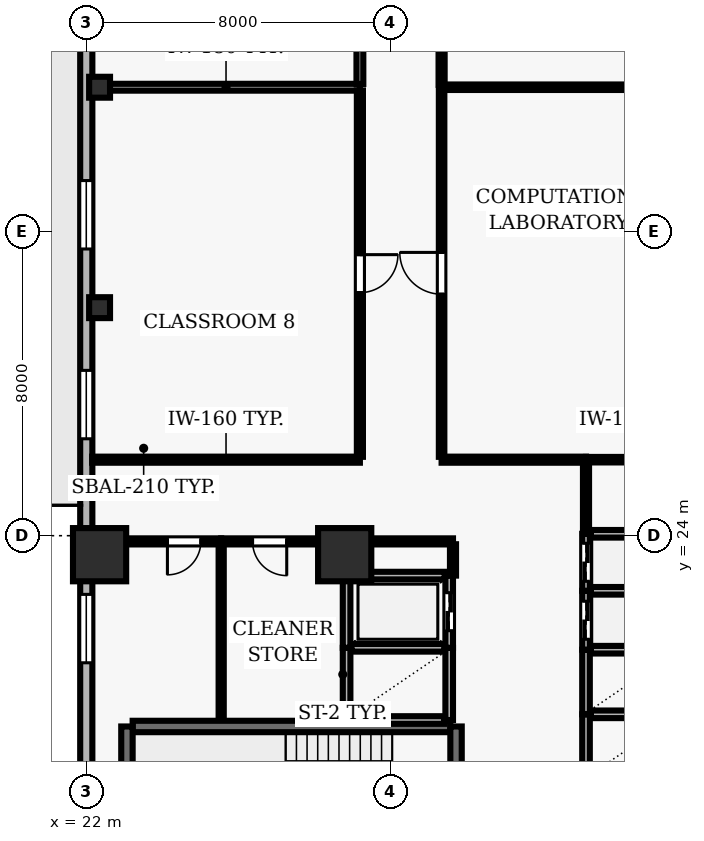
"""IFC4 building model, lengths in metres.
Left out: names, types, materials, properties, quantities, classifications, styles, units other than length and angle.
Written with IfcOpenShell. Run it as: python <this file> out.ifc"""

import sys

from ifc_helpers import new_model, si_unit, direction, frame, frame_2d, origin, origin_2d, place, context, subcontext, project, spatial, rectangle, hollow_rectangle, extrude, element, fill, save


model = new_model("IFC4")
c1 = context("Model", 3, precision=1e-05, world=origin(), true_north=direction((0.0, 1.0)))
c2 = subcontext(c1, "Body", "Model", "MODEL_VIEW")
j1 = project(units=[si_unit("LENGTHUNIT", "METRE"), si_unit("PLANEANGLEUNIT", "RADIAN")], contexts=[c1])
p1 = place(None, origin())
s1 = spatial("IfcSite", under=j1, at=p1, CompositionType="ELEMENT")
p2 = place(p1, origin())
s2 = spatial("IfcBuilding", under=s1, at=p2, CompositionType="ELEMENT")
p3 = place(p2, frame((0.0, 0.0, 31.0)))
s3 = spatial("IfcBuildingStorey", under=s2, at=p3, CompositionType="ELEMENT", Elevation=31.0)
for number, where, z_axis, x_axis in (
    (1, (22.35, 23.5, 0.0), (0.0, 0.0, 1.0), (1.0, 0.0, 0.0)),
    (2, (28.8, 23.5, 0.0), (0.0, 0.0, 1.0), (1.0, 0.0, 0.0)),
):
    element("IfcColumn", number, at=place(p3, frame(where, z_axis=z_axis, x_axis=x_axis)), inside=s3, PredefinedType="COLUMN", context=c2, shape_type="SweptSolid", body=[
        extrude(rectangle(XDim=1.4, YDim=1.4, at=origin_2d()), origin(), (0.0, 0.0, 1.0), 3.9),
    ])
for number, where, z_axis, x_axis in (
    (3, (22.35, 30.0, 0.0), (0.0, 0.0, 1.0), (1.0, 0.0, 0.0)),
    (4, (22.35, 35.8, 0.0), (0.0, 0.0, 1.0), (1.0, 0.0, 0.0)),
):
    element("IfcColumn", number, at=place(p3, frame(where, z_axis=z_axis, x_axis=x_axis)), inside=s3, PredefinedType="COLUMN", context=c2, shape_type="SweptSolid", body=[
        extrude(hollow_rectangle(XDim=0.55, YDim=0.55, WallThickness=0.025, at=origin_2d()), origin(), (0.0, 0.0, 1.0), 3.9),
    ])
p4 = place(p3, frame((22.0, 51.5, 0.0), z_axis=(0.0, 0.0, 1.0), x_axis=(0.0, -1.0, 0.0)))
e5 = element("IfcWall", 5, at=p4, inside=s3, PredefinedType="SOLIDWALL", context=c2, shape_type="SweptSolid", body=[
    extrude(rectangle(XDim=49.0, YDim=0.32, at=frame_2d((24.5, 0.0))), origin(), (0.0, 0.0, 1.0), 3.69),
])
p5 = place(p4, frame((12.1, 0.0, 0.0)))
e6 = element("IfcOpeningElement", 6, at=p5, cuts=e5, PredefinedType="OPENING", context=c2, shape_type="SweptSolid", body=[
    extrude(rectangle(XDim=1.0, YDim=2.2, at=frame_2d((0.5, 1.1))), frame((0.0, 0.17, 0.0), z_axis=(0.0, -1.0, 0.0), x_axis=(1.0, 0.0, 0.0)), (0.0, 0.0, 1.0), 0.34),
])
p6 = place(p4, frame((1.822, 0.0, 0.9)))
e7 = element("IfcOpeningElement", 7, at=p6, cuts=e5, PredefinedType="OPENING", context=c2, shape_type="SweptSolid", body=[
    extrude(rectangle(XDim=1.8, YDim=1.8, at=frame_2d((0.9, 0.9))), frame((0.0, 0.17, 0.0), z_axis=(0.0, -1.0, 0.0), x_axis=(1.0, 0.0, 0.0)), (0.0, 0.0, 1.0), 0.34),
])
p7 = place(p4, frame((7.267, 0.0, 0.9)))
e8 = element("IfcOpeningElement", 8, at=p7, cuts=e5, PredefinedType="OPENING", context=c2, shape_type="SweptSolid", body=[
    extrude(rectangle(XDim=1.8, YDim=1.8, at=frame_2d((0.9, 0.9))), frame((0.0, 0.17, 0.0), z_axis=(0.0, -1.0, 0.0), x_axis=(1.0, 0.0, 0.0)), (0.0, 0.0, 1.0), 0.34),
])
p8 = place(p4, frame((18.156, 0.0, 0.9)))
e9 = element("IfcOpeningElement", 9, at=p8, cuts=e5, PredefinedType="OPENING", context=c2, shape_type="SweptSolid", body=[
    extrude(rectangle(XDim=1.8, YDim=1.8, at=frame_2d((0.9, 0.9))), frame((0.0, 0.17, 0.0), z_axis=(0.0, -1.0, 0.0), x_axis=(1.0, 0.0, 0.0)), (0.0, 0.0, 1.0), 0.34),
])
p9 = place(p4, frame((23.15, 0.0, 0.9)))
e10 = element("IfcOpeningElement", 10, at=p9, cuts=e5, PredefinedType="OPENING", context=c2, shape_type="SweptSolid", body=[
    extrude(rectangle(XDim=1.8, YDim=1.8, at=frame_2d((0.9, 0.9))), frame((0.0, 0.17, 0.0), z_axis=(0.0, -1.0, 0.0), x_axis=(1.0, 0.0, 0.0)), (0.0, 0.0, 1.0), 0.34),
])
p10 = place(p4, frame((29.044, 0.0, 0.9)))
e11 = element("IfcOpeningElement", 11, at=p10, cuts=e5, PredefinedType="OPENING", context=c2, shape_type="SweptSolid", body=[
    extrude(rectangle(XDim=1.8, YDim=1.8, at=frame_2d((0.9, 0.9))), frame((0.0, 0.17, 0.0), z_axis=(0.0, -1.0, 0.0), x_axis=(1.0, 0.0, 0.0)), (0.0, 0.0, 1.0), 0.34),
])
p11 = place(p4, frame((34.039, 0.0, 0.9)))
e12 = element("IfcOpeningElement", 12, at=p11, cuts=e5, PredefinedType="OPENING", context=c2, shape_type="SweptSolid", body=[
    extrude(rectangle(XDim=1.8, YDim=1.8, at=frame_2d((0.9, 0.9))), frame((0.0, 0.17, 0.0), z_axis=(0.0, -1.0, 0.0), x_axis=(1.0, 0.0, 0.0)), (0.0, 0.0, 1.0), 0.34),
])
p12 = place(p4, frame((39.933, 0.0, 0.9)))
e13 = element("IfcOpeningElement", 13, at=p12, cuts=e5, PredefinedType="OPENING", context=c2, shape_type="SweptSolid", body=[
    extrude(rectangle(XDim=1.8, YDim=1.8, at=frame_2d((0.9, 0.9))), frame((0.0, 0.17, 0.0), z_axis=(0.0, -1.0, 0.0), x_axis=(1.0, 0.0, 0.0)), (0.0, 0.0, 1.0), 0.34),
])
p13 = place(p3, frame((31.58, 18.98, 0.0), z_axis=(0.0, 0.0, 1.0), x_axis=(-1.0, 0.0, 0.0)))
e14 = element("IfcWall", 14, at=p13, inside=s3, PredefinedType="SHEAR", context=c2, shape_type="SweptSolid", body=[
    extrude(rectangle(XDim=8.36, YDim=0.3, at=frame_2d((4.18, 0.0))), origin(), (0.0, 0.0, 1.0), 3.69),
])
p14 = place(p3, frame((23.07, 18.98, 0.0), z_axis=(0.0, 0.0, 1.0), x_axis=(0.0, -1.0, 0.0)))
e15 = element("IfcWall", 15, at=p14, inside=s3, PredefinedType="SHEAR", context=c2, shape_type="SweptSolid", body=[
    extrude(rectangle(XDim=3.51, YDim=0.3, at=frame_2d((1.755, 0.0))), origin(), (0.0, 0.0, 1.0), 3.69),
])
p15 = place(p3, frame((31.73, 15.47, 0.0), z_axis=(0.0, 0.0, 1.0), x_axis=(0.0, 1.0, 0.0)))
e16 = element("IfcWall", 16, at=p15, inside=s3, PredefinedType="SHEAR", context=c2, shape_type="SweptSolid", body=[
    extrude(rectangle(XDim=3.51, YDim=0.3, at=frame_2d((1.755, 0.0))), origin(), (0.0, 0.0, 1.0), 3.69),
])
p16 = place(p15, frame((1.18, 0.0, 0.0)))
e17 = element("IfcOpeningElement", 17, at=p16, cuts=e16, PredefinedType="OPENING", context=c2, shape_type="SweptSolid", body=[
    extrude(rectangle(XDim=1.15, YDim=2.15, at=frame_2d((0.575, 1.075))), frame((0.0, 0.16, 0.0), z_axis=(0.0, -1.0, 0.0), x_axis=(1.0, 0.0, 0.0)), (0.0, 0.0, 1.0), 0.32),
])
p17 = place(p3, frame((35.15, 19.3, 0.0), z_axis=(0.0, 0.0, 1.0), x_axis=(0.0, -1.0, 0.0)))
e18 = element("IfcWall", 18, at=p17, inside=s3, PredefinedType="SOLIDWALL", context=c2, shape_type="SweptSolid", body=[
    extrude(rectangle(XDim=1.7, YDim=0.2, at=frame_2d((0.85, 0.0))), origin(), (0.0, 0.0, 1.0), 3.69),
])
p18 = place(p3, frame((37.42, 19.3, 0.0), z_axis=(0.0, 0.0, 1.0), x_axis=(-1.0, 0.0, 0.0)))
e19 = element("IfcWall", 19, at=p18, inside=s3, PredefinedType="SOLIDWALL", context=c2, shape_type="SweptSolid", body=[
    extrude(rectangle(XDim=2.14, YDim=0.2, at=frame_2d((1.07, 0.0))), origin(), (0.0, 0.0, 1.0), 3.69),
])
p19 = place(p3, frame((35.15, 21.0, 0.0), z_axis=(0.0, 0.0, 1.0), x_axis=(0.0, -1.0, 0.0)))
e20 = element("IfcWall", 20, at=p19, inside=s3, PredefinedType="SOLIDWALL", context=c2, shape_type="SweptSolid", body=[
    extrude(rectangle(XDim=1.7, YDim=0.2, at=frame_2d((0.85, 0.0))), origin(), (0.0, 0.0, 1.0), 3.69),
])
p20 = place(p3, frame((37.42, 21.0, 0.0), z_axis=(0.0, 0.0, 1.0), x_axis=(-1.0, 0.0, 0.0)))
e21 = element("IfcWall", 21, at=p20, inside=s3, PredefinedType="SOLIDWALL", context=c2, shape_type="SweptSolid", body=[
    extrude(rectangle(XDim=2.14, YDim=0.2, at=frame_2d((1.07, 0.0))), origin(), (0.0, 0.0, 1.0), 3.69),
])
for number, where, z_axis, x_axis in (
    (22, (28.85, 21.05, 0.0), (0.0, 0.0, 1.0), (0.0, -1.0, 0.0)),
    (23, (31.55, 19.15, 0.0), (0.0, 0.0, 1.0), (0.0, 1.0, 0.0)),
):
    element("IfcWall", number, at=place(p3, frame(where, z_axis=z_axis, x_axis=x_axis)), inside=s3, PredefinedType="SOLIDWALL", context=c2, shape_type="SweptSolid", body=[
        extrude(rectangle(XDim=1.9, YDim=0.2, at=frame_2d((0.95, 0.0))), origin(), (0.0, 0.0, 1.0), 3.69),
    ])
for number, where, z_axis, x_axis in (
    (24, (28.98, 19.15, 0.0), (0.0, 0.0, 1.0), (1.0, 0.0, 0.0)),
    (25, (31.42, 21.05, 0.0), (0.0, 0.0, 1.0), (-1.0, 0.0, 0.0)),
):
    element("IfcWall", number, at=place(p3, frame(where, z_axis=z_axis, x_axis=x_axis)), inside=s3, PredefinedType="SOLIDWALL", context=c2, shape_type="SweptSolid", body=[
        extrude(rectangle(XDim=2.44, YDim=0.2, at=frame_2d((1.22, 0.0))), origin(), (0.0, 0.0, 1.0), 3.69),
    ])
p21 = place(p3, frame((35.15, 22.55, 0.0), z_axis=(0.0, 0.0, 1.0), x_axis=(0.0, -1.0, 0.0)))
e26 = element("IfcWall", 26, at=p21, inside=s3, PredefinedType="SOLIDWALL", context=c2, shape_type="SweptSolid", body=[
    extrude(rectangle(XDim=1.55, YDim=0.2, at=frame_2d((0.775, 0.0))), origin(), (0.0, 0.0, 1.0), 3.69),
])
p22 = place(p21, frame((0.275, 0.0, 0.0)))
e27 = element("IfcOpeningElement", 27, at=p22, cuts=e26, PredefinedType="OPENING", context=c2, shape_type="SweptSolid", body=[
    extrude(rectangle(XDim=1.0, YDim=2.1, at=frame_2d((0.5, 1.05))), frame((0.0, 0.11, 0.0), z_axis=(0.0, -1.0, 0.0), x_axis=(1.0, 0.0, 0.0)), (0.0, 0.0, 1.0), 0.22),
])
p23 = place(p3, frame((37.42, 22.55, 0.0), z_axis=(0.0, 0.0, 1.0), x_axis=(-1.0, 0.0, 0.0)))
e28 = element("IfcWall", 28, at=p23, inside=s3, PredefinedType="SOLIDWALL", context=c2, shape_type="SweptSolid", body=[
    extrude(rectangle(XDim=2.14, YDim=0.2, at=frame_2d((1.07, 0.0))), origin(), (0.0, 0.0, 1.0), 3.69),
])
p24 = place(p3, frame((35.15, 24.05, 0.0), z_axis=(0.0, 0.0, 1.0), x_axis=(0.0, -1.0, 0.0)))
e29 = element("IfcWall", 29, at=p24, inside=s3, PredefinedType="SOLIDWALL", context=c2, shape_type="SweptSolid", body=[
    extrude(rectangle(XDim=1.5, YDim=0.2, at=frame_2d((0.75, 0.0))), origin(), (0.0, 0.0, 1.0), 3.69),
])
p25 = place(p24, frame((0.25, 0.0, 0.0)))
e30 = element("IfcOpeningElement", 30, at=p25, cuts=e29, PredefinedType="OPENING", context=c2, shape_type="SweptSolid", body=[
    extrude(rectangle(XDim=1.0, YDim=2.1, at=frame_2d((0.5, 1.05))), frame((0.0, 0.11, 0.0), z_axis=(0.0, -1.0, 0.0), x_axis=(1.0, 0.0, 0.0)), (0.0, 0.0, 1.0), 0.22),
])
p26 = place(p3, frame((37.42, 24.05, 0.0), z_axis=(0.0, 0.0, 1.0), x_axis=(-1.0, 0.0, 0.0)))
e31 = element("IfcWall", 31, at=p26, inside=s3, PredefinedType="SOLIDWALL", context=c2, shape_type="SweptSolid", body=[
    extrude(rectangle(XDim=2.14, YDim=0.2, at=frame_2d((1.07, 0.0))), origin(), (0.0, 0.0, 1.0), 3.69),
])
p27 = place(p3, frame((28.85, 22.95, 0.0), z_axis=(0.0, 0.0, 1.0), x_axis=(0.0, -1.0, 0.0)))
e32 = element("IfcWall", 32, at=p27, inside=s3, PredefinedType="SOLIDWALL", context=c2, shape_type="SweptSolid", body=[
    extrude(rectangle(XDim=1.9, YDim=0.2, at=frame_2d((0.95, 0.0))), origin(), (0.0, 0.0, 1.0), 3.69),
])
p28 = place(p3, frame((31.55, 21.05, 0.0), z_axis=(0.0, 0.0, 1.0), x_axis=(0.0, 1.0, 0.0)))
e33 = element("IfcWall", 33, at=p28, inside=s3, PredefinedType="SOLIDWALL", context=c2, shape_type="SweptSolid", body=[
    extrude(rectangle(XDim=1.9, YDim=0.2, at=frame_2d((0.95, 0.0))), origin(), (0.0, 0.0, 1.0), 3.69),
])
p29 = place(p28, frame((0.45, 0.0, 0.0)))
e34 = element("IfcOpeningElement", 34, at=p29, cuts=e33, PredefinedType="OPENING", context=c2, shape_type="SweptSolid", body=[
    extrude(rectangle(XDim=1.0, YDim=2.1, at=frame_2d((0.5, 1.05))), frame((0.0, 0.11, 0.0), z_axis=(0.0, -1.0, 0.0), x_axis=(1.0, 0.0, 0.0)), (0.0, 0.0, 1.0), 0.22),
])
p30 = place(p3, frame((31.43, 22.95, 0.0), z_axis=(0.0, 0.0, 1.0), x_axis=(-1.0, 0.0, 0.0)))
e35 = element("IfcWall", 35, at=p30, inside=s3, PredefinedType="SOLIDWALL", context=c2, shape_type="SweptSolid", body=[
    extrude(rectangle(XDim=2.46, YDim=0.2, at=frame_2d((1.23, 0.0))), origin(), (0.0, 0.0, 1.0), 3.69),
])
p31 = place(p3, frame((25.55, 23.85, 0.0), z_axis=(0.0, 0.0, 1.0), x_axis=(-1.0, 0.0, 0.0)))
e36 = element("IfcWall", 36, at=p31, inside=s3, PredefinedType="PARTITIONING", context=c2, shape_type="SweptSolid", body=[
    extrude(rectangle(XDim=3.35, YDim=0.16, at=frame_2d((1.675, 0.0))), origin(), (0.0, 0.0, 1.0), 2.995),
])
p32 = place(p31, frame((0.535, 0.0, 0.0)))
e37 = element("IfcOpeningElement", 37, at=p32, cuts=e36, PredefinedType="OPENING", context=c2, shape_type="SweptSolid", body=[
    extrude(rectangle(XDim=0.88, YDim=2.1, at=frame_2d((0.44, 1.05))), frame((0.0, 0.09, 0.0), z_axis=(0.0, -1.0, 0.0), x_axis=(1.0, 0.0, 0.0)), (0.0, 0.0, 1.0), 0.18),
])
p33 = place(p3, frame((28.8, 23.85, 0.0), z_axis=(0.0, 0.0, 1.0), x_axis=(-1.0, 0.0, 0.0)))
e38 = element("IfcWall", 38, at=p33, inside=s3, PredefinedType="PARTITIONING", context=c2, shape_type="SweptSolid", body=[
    extrude(rectangle(XDim=3.25, YDim=0.16, at=frame_2d((1.625, 0.0))), origin(), (0.0, 0.0, 1.0), 2.995),
])
p34 = place(p33, frame((1.525, 0.0, 0.0)))
e39 = element("IfcOpeningElement", 39, at=p34, cuts=e38, PredefinedType="OPENING", context=c2, shape_type="SweptSolid", body=[
    extrude(rectangle(XDim=0.9, YDim=2.1, at=frame_2d((0.45, 1.05))), frame((0.0, 0.09, 0.0), z_axis=(0.0, -1.0, 0.0), x_axis=(1.0, 0.0, 0.0)), (0.0, 0.0, 1.0), 0.18),
])
p35 = place(p3, frame((28.8, 23.85, 0.0), z_axis=(0.0, 0.0, 1.0), x_axis=(1.0, 0.0, 0.0)))
e40 = element("IfcWall", 40, at=p35, inside=s3, PredefinedType="PARTITIONING", context=c2, shape_type="SweptSolid", body=[
    extrude(rectangle(XDim=2.85, YDim=0.16, at=frame_2d((1.425, 0.0))), origin(), (0.0, 0.0, 1.0), 3.69),
])
p36 = place(p3, frame((29.2, 26.0, 0.0), z_axis=(0.0, 0.0, 1.0), x_axis=(-1.0, 0.0, 0.0)))
e41 = element("IfcWall", 41, at=p36, inside=s3, PredefinedType="PARTITIONING", context=c2, shape_type="SweptSolid", body=[
    extrude(rectangle(XDim=7.045, YDim=0.16, at=frame_2d((3.522, 0.0))), origin(), (0.0, 0.0, 1.0), 3.69),
])
p37 = place(p3, frame((29.2, 35.8, 0.0), z_axis=(0.0, 0.0, 1.0), x_axis=(-1.0, 0.0, 0.0)))
e42 = element("IfcWall", 42, at=p37, inside=s3, PredefinedType="PARTITIONING", context=c2, shape_type="SweptSolid", body=[
    extrude(rectangle(XDim=7.045, YDim=0.18, at=frame_2d((3.522, 0.0))), origin(), (0.0, 0.0, 1.0), 2.995),
])
p38 = place(p3, frame((35.15, 26.0, 0.0), z_axis=(0.0, 0.0, 1.0), x_axis=(-1.0, 0.0, 0.0)))
e43 = element("IfcWall", 43, at=p38, inside=s3, PredefinedType="PARTITIONING", context=c2, shape_type="SweptSolid", body=[
    extrude(rectangle(XDim=3.8, YDim=0.16, at=frame_2d((1.9, 0.0))), origin(), (0.0, 0.0, 1.0), 3.69),
])
p39 = place(p3, frame((35.15, 26.0, 0.0), z_axis=(0.0, 0.0, 1.0), x_axis=(1.0, 0.0, 0.0)))
e44 = element("IfcWall", 44, at=p39, inside=s3, PredefinedType="PARTITIONING", context=c2, shape_type="SweptSolid", body=[
    extrude(rectangle(XDim=2.7, YDim=0.145, at=frame_2d((1.35, 0.0))), origin(), (0.0, 0.0, 1.0), 3.69),
])
p40 = place(p3, frame((37.845, 35.8, 0.0), z_axis=(0.0, 0.0, 1.0), x_axis=(-1.0, 0.0, 0.0)))
e45 = element("IfcWall", 45, at=p40, inside=s3, PredefinedType="PARTITIONING", context=c2, shape_type="SweptSolid", body=[
    extrude(rectangle(XDim=6.495, YDim=0.145, at=frame_2d((3.248, 0.0))), origin(), (0.0, 0.0, 1.0), 2.995),
])
p41 = place(p3, frame((25.55, 19.16, 0.0), z_axis=(0.0, 0.0, 1.0), x_axis=(0.0, 1.0, 0.0)))
e46 = element("IfcWall", 46, at=p41, inside=s3, PredefinedType="PARTITIONING", context=c2, shape_type="SweptSolid", body=[
    extrude(rectangle(XDim=4.615, YDim=0.135, at=frame_2d((2.308, 0.0))), origin(), (0.0, 0.0, 1.0), 3.69),
])
p42 = place(p3, frame((28.8, 22.95, 0.0), z_axis=(0.0, 0.0, 1.0), x_axis=(0.0, 1.0, 0.0)))
e47 = element("IfcWall", 47, at=p42, inside=s3, PredefinedType="PARTITIONING", context=c2, shape_type="SweptSolid", body=[
    extrude(rectangle(XDim=0.825, YDim=0.125, at=frame_2d((0.413, 0.0))), origin(), (0.0, 0.0, 1.0), 3.69),
])
p43 = place(p3, frame((29.2, 35.715, 0.0), z_axis=(0.0, 0.0, 1.0), x_axis=(0.0, -1.0, 0.0)))
e48 = element("IfcWall", 48, at=p43, inside=s3, PredefinedType="PARTITIONING", context=c2, shape_type="SweptSolid", body=[
    extrude(rectangle(XDim=9.64, YDim=0.16, at=frame_2d((4.82, 0.0))), origin(), (0.0, 0.0, 1.0), 3.69),
])
p44 = place(p43, frame((4.32, 0.0, 0.0)))
e49 = element("IfcOpeningElement", 49, at=p44, cuts=e48, PredefinedType="OPENING", context=c2, shape_type="SweptSolid", body=[
    extrude(rectangle(XDim=1.0, YDim=2.1, at=frame_2d((0.5, 1.05))), frame((0.0, 0.09, 0.0), z_axis=(0.0, -1.0, 0.0), x_axis=(1.0, 0.0, 0.0)), (0.0, 0.0, 1.0), 0.18),
])
p45 = place(p3, frame((29.2, 44.955, 0.0), z_axis=(0.0, 0.0, 1.0), x_axis=(0.0, -1.0, 0.0)))
e50 = element("IfcWall", 50, at=p45, inside=s3, PredefinedType="PARTITIONING", context=c2, shape_type="SweptSolid", body=[
    extrude(rectangle(XDim=9.07, YDim=0.18, at=frame_2d((4.535, 0.0))), origin(), (0.0, 0.0, 1.0), 3.69),
])
p46 = place(p45, frame((4.06, 0.0, 0.0)))
e51 = element("IfcOpeningElement", 51, at=p46, cuts=e50, PredefinedType="OPENING", context=c2, shape_type="SweptSolid", body=[
    extrude(rectangle(XDim=0.95, YDim=2.1, at=frame_2d((0.475, 1.05))), frame((0.0, 0.1, 0.0), z_axis=(0.0, -1.0, 0.0), x_axis=(1.0, 0.0, 0.0)), (0.0, 0.0, 1.0), 0.2),
])
p47 = place(p3, frame((31.35, 26.075, 0.0), z_axis=(0.0, 0.0, 1.0), x_axis=(0.0, 1.0, 0.0)))
e52 = element("IfcWall", 52, at=p47, inside=s3, PredefinedType="PARTITIONING", context=c2, shape_type="SweptSolid", body=[
    extrude(rectangle(XDim=9.657, YDim=0.145, at=frame_2d((4.829, 0.0))), origin(), (0.0, 0.0, 1.0), 3.69),
])
p48 = place(p47, frame((4.279, 0.0, 0.0)))
e53 = element("IfcOpeningElement", 53, at=p48, cuts=e52, PredefinedType="OPENING", context=c2, shape_type="SweptSolid", body=[
    extrude(rectangle(XDim=1.1, YDim=2.15, at=frame_2d((0.55, 1.075))), frame((0.0, 0.083, 0.0), z_axis=(0.0, -1.0, 0.0), x_axis=(1.0, 0.0, 0.0)), (0.0, 0.0, 1.0), 0.165),
])
p49 = place(p3, frame((31.35, 35.867, 0.0), z_axis=(0.0, 0.0, 1.0), x_axis=(0.0, 1.0, 0.0)))
e54 = element("IfcWall", 54, at=p49, inside=s3, PredefinedType="PARTITIONING", context=c2, shape_type="SweptSolid", body=[
    extrude(rectangle(XDim=9.116, YDim=0.16, at=frame_2d((4.558, 0.0))), origin(), (0.0, 0.0, 1.0), 3.69),
])
p50 = place(p49, frame((4.108, 0.0, 0.0)))
e55 = element("IfcOpeningElement", 55, at=p50, cuts=e54, PredefinedType="OPENING", context=c2, shape_type="SweptSolid", body=[
    extrude(rectangle(XDim=0.9, YDim=2.1, at=frame_2d((0.45, 1.05))), frame((0.0, 0.09, 0.0), z_axis=(0.0, -1.0, 0.0), x_axis=(1.0, 0.0, 0.0)), (0.0, 0.0, 1.0), 0.18),
])
p51 = place(p3, frame((31.65, 23.775, 0.0), z_axis=(0.0, 0.0, 1.0), x_axis=(0.0, -1.0, 0.0)))
e56 = element("IfcWall", 56, at=p51, inside=s3, PredefinedType="PARTITIONING", context=c2, shape_type="SweptSolid", body=[
    extrude(rectangle(XDim=0.825, YDim=0.16, at=frame_2d((0.413, 0.0))), origin(), (0.0, 0.0, 1.0), 3.69),
])
p52 = place(p3, frame((35.15, 24.07, 0.0), z_axis=(0.0, 0.0, 1.0), x_axis=(0.0, 1.0, 0.0)))
e57 = element("IfcWall", 57, at=p52, inside=s3, PredefinedType="PARTITIONING", context=c2, shape_type="SweptSolid", body=[
    extrude(rectangle(XDim=1.855, YDim=0.16, at=frame_2d((0.927, 0.0))), origin(), (0.0, 0.0, 1.0), 3.69),
])
p53 = place(p8, origin())
e58 = element("IfcWindow", 58, at=p53, inside=s3, PartitioningType="SINGLE_PANEL", PredefinedType="WINDOW", context=c2, shape_type="SweptSolid", body=[
    extrude(rectangle(XDim=1.8, YDim=1.8, at=frame_2d((0.9, 0.9))), frame((0.0, 0.03, 0.0), z_axis=(0.0, -1.0, 0.0), x_axis=(1.0, 0.0, 0.0)), (0.0, 0.0, 1.0), 0.06),
])
fill(e9, e58)
p54 = place(p9, origin())
e59 = element("IfcWindow", 59, at=p54, inside=s3, PartitioningType="SINGLE_PANEL", PredefinedType="WINDOW", context=c2, shape_type="SweptSolid", body=[
    extrude(rectangle(XDim=1.8, YDim=1.8, at=frame_2d((0.9, 0.9))), frame((0.0, 0.03, 0.0), z_axis=(0.0, -1.0, 0.0), x_axis=(1.0, 0.0, 0.0)), (0.0, 0.0, 1.0), 0.06),
])
fill(e10, e59)
p55 = place(p10, origin())
e60 = element("IfcWindow", 60, at=p55, inside=s3, PartitioningType="SINGLE_PANEL", PredefinedType="WINDOW", context=c2, shape_type="SweptSolid", body=[
    extrude(rectangle(XDim=1.8, YDim=1.8, at=frame_2d((0.9, 0.9))), frame((0.0, 0.03, 0.0), z_axis=(0.0, -1.0, 0.0), x_axis=(1.0, 0.0, 0.0)), (0.0, 0.0, 1.0), 0.06),
])
fill(e11, e60)
p56 = place(p22, origin())
e61 = element("IfcDoor", 61, at=p56, inside=s3, OperationType="DOUBLE_DOOR_SLIDING", PredefinedType="DOOR", context=c2, shape_type="SweptSolid", body=[
    extrude(rectangle(XDim=1.0, YDim=2.1, at=frame_2d((0.5, 1.05))), frame((0.0, 0.025, 0.0), z_axis=(0.0, -1.0, 0.0), x_axis=(1.0, 0.0, 0.0)), (0.0, 0.0, 1.0), 0.05),
])
fill(e27, e61)
p57 = place(p25, origin())
e62 = element("IfcDoor", 62, at=p57, inside=s3, OperationType="DOUBLE_DOOR_SLIDING", PredefinedType="DOOR", context=c2, shape_type="SweptSolid", body=[
    extrude(rectangle(XDim=1.0, YDim=2.1, at=frame_2d((0.5, 1.05))), frame((0.0, 0.025, 0.0), z_axis=(0.0, -1.0, 0.0), x_axis=(1.0, 0.0, 0.0)), (0.0, 0.0, 1.0), 0.05),
])
fill(e30, e62)
p58 = place(p29, origin())
e63 = element("IfcDoor", 63, at=p58, inside=s3, OperationType="DOUBLE_DOOR_SLIDING", PredefinedType="DOOR", context=c2, shape_type="SweptSolid", body=[
    extrude(rectangle(XDim=1.0, YDim=2.1, at=frame_2d((0.5, 1.05))), frame((0.0, 0.025, 0.0), z_axis=(0.0, -1.0, 0.0), x_axis=(1.0, 0.0, 0.0)), (0.0, 0.0, 1.0), 0.05),
])
fill(e34, e63)
p59 = place(p32, origin())
e64 = element("IfcDoor", 64, at=p59, inside=s3, OperationType="SINGLE_SWING_RIGHT", PredefinedType="DOOR", context=c2, shape_type="SweptSolid", body=[
    extrude(rectangle(XDim=0.88, YDim=2.1, at=frame_2d((0.44, 1.05))), frame((0.0, 0.025, 0.0), z_axis=(0.0, -1.0, 0.0), x_axis=(1.0, 0.0, 0.0)), (0.0, 0.0, 1.0), 0.05),
])
fill(e37, e64)
p60 = place(p34, origin())
e65 = element("IfcDoor", 65, at=p60, inside=s3, OperationType="SINGLE_SWING_LEFT", PredefinedType="DOOR", context=c2, shape_type="SweptSolid", body=[
    extrude(rectangle(XDim=0.9, YDim=2.1, at=frame_2d((0.45, 1.05))), frame((0.0, 0.025, 0.0), z_axis=(0.0, -1.0, 0.0), x_axis=(1.0, 0.0, 0.0)), (0.0, 0.0, 1.0), 0.05),
])
fill(e39, e65)
p61 = place(p44, origin())
e66 = element("IfcDoor", 66, at=p61, inside=s3, OperationType="SINGLE_SWING_LEFT", PredefinedType="DOOR", context=c2, shape_type="SweptSolid", body=[
    extrude(rectangle(XDim=1.0, YDim=2.1, at=frame_2d((0.5, 1.05))), frame((0.0, 0.025, 0.0), z_axis=(0.0, -1.0, 0.0), x_axis=(1.0, 0.0, 0.0)), (0.0, 0.0, 1.0), 0.05),
])
fill(e49, e66)
p62 = place(p48, origin())
e67 = element("IfcDoor", 67, at=p62, inside=s3, OperationType="SINGLE_SWING_RIGHT", PredefinedType="DOOR", context=c2, shape_type="SweptSolid", body=[
    extrude(rectangle(XDim=1.1, YDim=2.15, at=frame_2d((0.55, 1.075))), frame((0.0, 0.025, 0.0), z_axis=(0.0, -1.0, 0.0), x_axis=(1.0, 0.0, 0.0)), (0.0, 0.0, 1.0), 0.05),
])
fill(e53, e67)
save(model, sys.argv[1])
